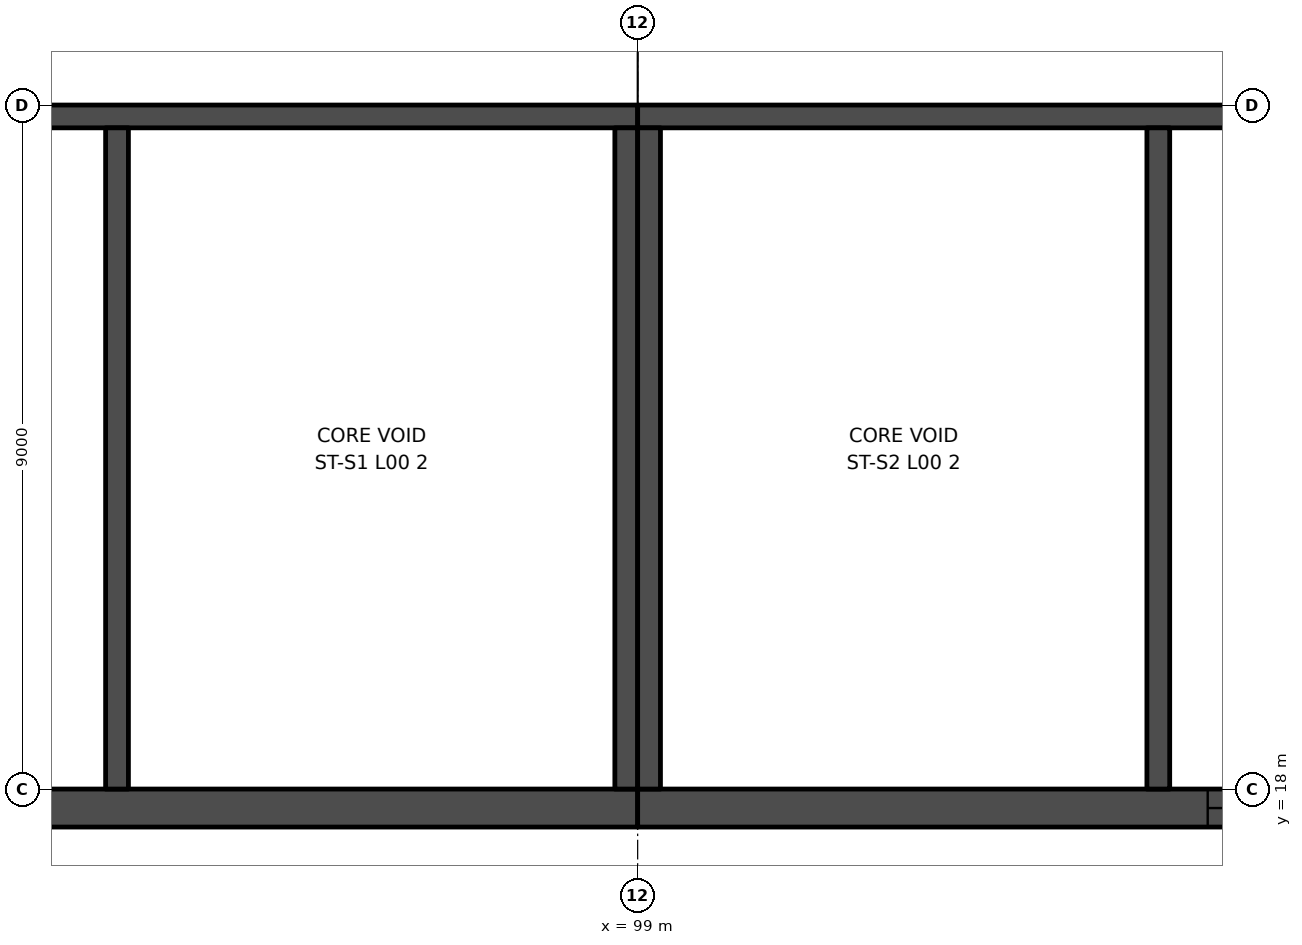
"""IFC4 building model, lengths in metres.
Left out: names, types, materials, properties, quantities, classifications, styles, units other than length and angle.
Written with IfcOpenShell. Run it as: python <this file> out.ifc"""

import sys

from ifc_helpers import new_model, si_unit, direction, frame, frame_2d, origin, place, context, subcontext, project, spatial, rectangle, extrude, element, fill, save


model = new_model("IFC4")
c1 = context("Model", 3, precision=1e-05, world=origin(), true_north=direction((0.0, 1.0)))
c2 = subcontext(c1, "Body", "Model", "MODEL_VIEW")
j1 = project(units=[si_unit("LENGTHUNIT", "METRE"), si_unit("PLANEANGLEUNIT", "RADIAN")], contexts=[c1])
p1 = place(None, origin())
s1 = spatial("IfcSite", under=j1, at=p1, CompositionType="ELEMENT")
p2 = place(p1, origin())
s2 = spatial("IfcBuilding", under=s1, at=p2, CompositionType="ELEMENT")
p3 = place(p2, origin())
s3 = spatial("IfcBuildingStorey", under=s2, at=p3, CompositionType="ELEMENT", Elevation=0.0)
p4 = place(p3, frame((81.0, 26.85, 0.0), z_axis=(0.0, 0.0, 1.0), x_axis=(1.0, 0.0, 0.0)))
e1 = element("IfcWall", 1, at=p4, inside=s3, PredefinedType="SHEAR", context=c2, shape_type="SweptSolid", body=[
    extrude(rectangle(XDim=18.0, YDim=0.3, at=frame_2d((9.0, 0.0))), origin(), (0.0, 0.0, 1.0), 7.0),
])
p5 = place(p4, frame((1.5, 0.0, 0.0)))
e2 = element("IfcOpeningElement", 2, at=p5, cuts=e1, PredefinedType="OPENING", context=c2, shape_type="SweptSolid", body=[
    extrude(rectangle(XDim=1.2, YDim=2.1, at=frame_2d((0.6, 1.05))), frame((0.0, 0.16, 0.0), z_axis=(0.0, -1.0, 0.0), x_axis=(1.0, 0.0, 0.0)), (0.0, 0.0, 1.0), 0.32),
])
p6 = place(p3, frame((81.0, 17.75, 0.0), z_axis=(0.0, 0.0, 1.0), x_axis=(1.0, 0.0, 0.0)))
e3 = element("IfcWall", 3, at=p6, inside=s3, PredefinedType="SHEAR", context=c2, shape_type="SweptSolid", body=[
    extrude(rectangle(XDim=18.0, YDim=0.5, at=frame_2d((9.0, 0.0))), origin(), (0.0, 0.0, 1.0), 7.0),
])
p7 = place(p6, frame((0.8, 0.0, 0.0)))
e4 = element("IfcOpeningElement", 4, at=p7, cuts=e3, PredefinedType="OPENING", context=c2, shape_type="SweptSolid", body=[
    extrude(rectangle(XDim=2.6, YDim=2.4, at=frame_2d((1.3, 1.2))), frame((0.0, 0.26, 0.0), z_axis=(0.0, -1.0, 0.0), x_axis=(1.0, 0.0, 0.0)), (0.0, 0.0, 1.0), 0.52),
])
for number, where, z_axis, x_axis in (
    (5, (98.85, 26.7, 0.0), (0.0, 0.0, 1.0), (0.0, -1.0, 0.0)),
    (6, (92.15, 26.7, 0.0), (0.0, 0.0, 1.0), (0.0, -1.0, 0.0)),
):
    element("IfcWall", number, at=place(p3, frame(where, z_axis=z_axis, x_axis=x_axis)), inside=s3, PredefinedType="SHEAR", context=c2, shape_type="SweptSolid", body=[
        extrude(rectangle(XDim=8.7, YDim=0.3, at=frame_2d((4.35, 0.0))), origin(), (0.0, 0.0, 1.0), 7.0),
    ])
p8 = place(p3, frame((117.0, 26.85, 0.0), z_axis=(0.0, 0.0, 1.0), x_axis=(-1.0, 0.0, 0.0)))
e7 = element("IfcWall", 7, at=p8, inside=s3, PredefinedType="SHEAR", context=c2, shape_type="SweptSolid", body=[
    extrude(rectangle(XDim=18.0, YDim=0.3, at=frame_2d((9.0, 0.0))), origin(), (0.0, 0.0, 1.0), 7.0),
])
p9 = place(p8, frame((8.6, 0.0, 0.0)))
e8 = element("IfcOpeningElement", 8, at=p9, cuts=e7, PredefinedType="OPENING", context=c2, shape_type="SweptSolid", body=[
    extrude(rectangle(XDim=1.2, YDim=2.1, at=frame_2d((0.6, 1.05))), frame((0.0, 0.16, 0.0), z_axis=(0.0, -1.0, 0.0), x_axis=(1.0, 0.0, 0.0)), (0.0, 0.0, 1.0), 0.32),
])
p10 = place(p3, frame((117.0, 17.75, 0.0), z_axis=(0.0, 0.0, 1.0), x_axis=(-1.0, 0.0, 0.0)))
e9 = element("IfcWall", 9, at=p10, inside=s3, PredefinedType="SHEAR", context=c2, shape_type="SweptSolid", body=[
    extrude(rectangle(XDim=18.0, YDim=0.5, at=frame_2d((9.0, 0.0))), origin(), (0.0, 0.0, 1.0), 7.0),
])
p11 = place(p10, frame((7.9, 0.0, 0.0)))
e10 = element("IfcOpeningElement", 10, at=p11, cuts=e9, PredefinedType="OPENING", context=c2, shape_type="SweptSolid", body=[
    extrude(rectangle(XDim=2.6, YDim=2.4, at=frame_2d((1.3, 1.2))), frame((0.0, 0.26, 0.0), z_axis=(0.0, -1.0, 0.0), x_axis=(1.0, 0.0, 0.0)), (0.0, 0.0, 1.0), 0.52),
])
for number, where, z_axis, x_axis in (
    (11, (99.15, 26.7, 0.0), (0.0, 0.0, 1.0), (0.0, -1.0, 0.0)),
    (12, (105.85, 26.7, 0.0), (0.0, 0.0, 1.0), (0.0, -1.0, 0.0)),
):
    element("IfcWall", number, at=place(p3, frame(where, z_axis=z_axis, x_axis=x_axis)), inside=s3, PredefinedType="SHEAR", context=c2, shape_type="SweptSolid", body=[
        extrude(rectangle(XDim=8.7, YDim=0.3, at=frame_2d((4.35, 0.0))), origin(), (0.0, 0.0, 1.0), 7.0),
    ])
p12 = place(p11, origin())
e13 = element("IfcDoor", 13, at=p12, inside=s3, OperationType="DOUBLE_DOOR_SINGLE_SWING", PredefinedType="DOOR", context=c2, shape_type="SweptSolid", body=[
    extrude(rectangle(XDim=2.6, YDim=2.4, at=frame_2d((1.3, 1.2))), frame((0.0, 0.025, 0.0), z_axis=(0.0, -1.0, 0.0), x_axis=(1.0, 0.0, 0.0)), (0.0, 0.0, 1.0), 0.05),
])
fill(e10, e13)
save(model, sys.argv[1])
